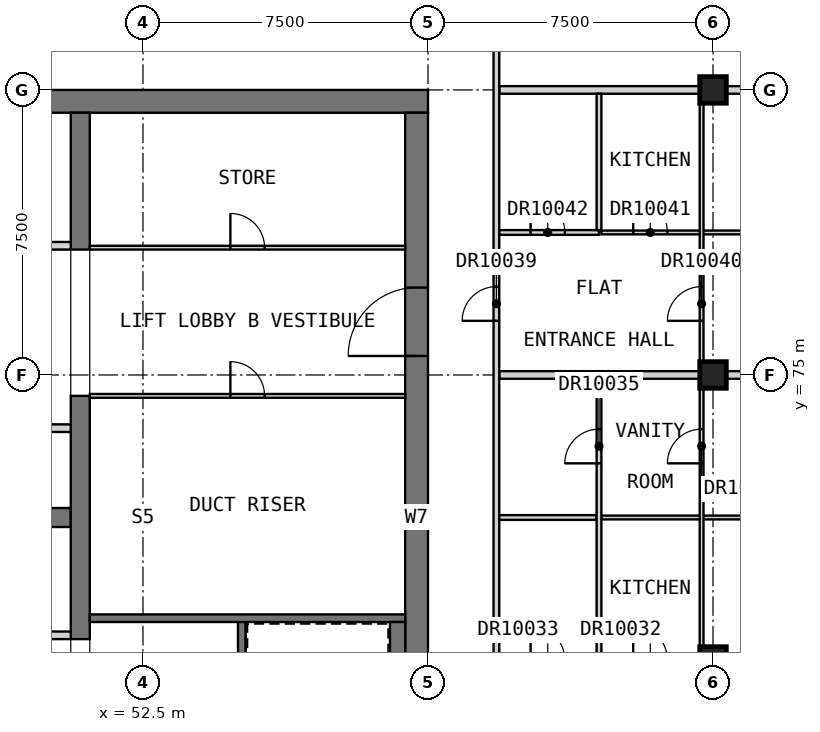
"""IFC4 building model, lengths in metres.
Left out: names, types, materials, properties, quantities, classifications, styles, units other than length and angle.
Written with IfcOpenShell. Run it as: python <this file> out.ifc"""

import sys

from ifc_helpers import new_model, si_unit, direction, frame, frame_2d, origin, origin_2d, place, context, subcontext, project, spatial, rectangle, extrude, element, fill, save


model = new_model("IFC4")
c1 = context("Model", 3, precision=1e-05, world=origin(), true_north=direction((0.0, 1.0)))
c2 = subcontext(c1, "Body", "Model", "MODEL_VIEW")
j1 = project(units=[si_unit("LENGTHUNIT", "METRE"), si_unit("PLANEANGLEUNIT", "RADIAN")], contexts=[c1])
p1 = place(None, origin())
s1 = spatial("IfcSite", under=j1, at=p1, CompositionType="ELEMENT")
p2 = place(p1, origin())
s2 = spatial("IfcBuilding", under=s1, at=p2, CompositionType="ELEMENT")
p3 = place(p2, frame((0.0, 0.0, 283.7)))
s3 = spatial("IfcBuildingStorey", under=s2, at=p3, CompositionType="ELEMENT", Elevation=283.7)
for number, where, z_axis, x_axis in (
    (1, (67.5, 67.5, 0.0), (0.0, 0.0, 1.0), (1.0, 0.0, 0.0)),
    (2, (67.5, 75.0, 0.0), (0.0, 0.0, 1.0), (1.0, 0.0, 0.0)),
    (3, (67.5, 82.5, 0.0), (0.0, 0.0, 1.0), (1.0, 0.0, 0.0)),
):
    element("IfcColumn", number, at=place(p3, frame(where, z_axis=z_axis, x_axis=x_axis)), inside=s3, PredefinedType="COLUMN", context=c2, shape_type="SweptSolid", body=[
        extrude(rectangle(XDim=0.7, YDim=0.7, at=origin_2d()), origin(), (0.0, 0.0, 1.0), 3.5),
    ])
p4 = place(p3, frame((30.0, 82.2, 0.0), z_axis=(0.0, 0.0, 1.0), x_axis=(1.0, 0.0, 0.0)))
e4 = element("IfcWall", 4, at=p4, inside=s3, PredefinedType="SHEAR", context=c2, shape_type="SweptSolid", body=[
    extrude(rectangle(XDim=30.0, YDim=0.6, at=frame_2d((15.0, 0.0))), origin(), (0.0, 0.0, 1.0), 3.5),
])
p5 = place(p3, frame((59.7, 60.6, 0.0), z_axis=(0.0, 0.0, 1.0), x_axis=(0.0, 1.0, 0.0)))
e5 = element("IfcWall", 5, at=p5, inside=s3, PredefinedType="SHEAR", context=c2, shape_type="SweptSolid", body=[
    extrude(rectangle(XDim=21.3, YDim=0.6, at=frame_2d((10.65, 0.0))), origin(), (0.0, 0.0, 1.0), 3.5),
])
p6 = place(p5, frame((14.9, 0.0, 0.0)))
e6 = element("IfcOpeningElement", 6, at=p6, cuts=e5, PredefinedType="OPENING", context=c2, shape_type="SweptSolid", body=[
    extrude(rectangle(XDim=1.8, YDim=2.1, at=frame_2d((0.9, 1.05))), frame((0.0, 0.31, 0.0), z_axis=(0.0, -1.0, 0.0), x_axis=(1.0, 0.0, 0.0)), (0.0, 0.0, 1.0), 0.62),
])
p7 = place(p3, frame((35.0, 71.25, 0.0), z_axis=(0.0, 0.0, 1.0), x_axis=(1.0, 0.0, 0.0)))
e7 = element("IfcWall", 7, at=p7, inside=s3, PredefinedType="SHEAR", context=c2, shape_type="SweptSolid", body=[
    extrude(rectangle(XDim=15.6, YDim=0.5, at=frame_2d((7.8, 0.0))), origin(), (0.0, 0.0, 1.0), 3.5),
])
p8 = place(p3, frame((50.85, 68.05, 0.0), z_axis=(0.0, 0.0, 1.0), x_axis=(0.0, 1.0, 0.0)))
e8 = element("IfcWall", 8, at=p8, inside=s3, PredefinedType="SHEAR", context=c2, shape_type="SweptSolid", body=[
    extrude(rectangle(XDim=6.4, YDim=0.5, at=frame_2d((3.2, 0.0))), origin(), (0.0, 0.0, 1.0), 3.5),
])
p9 = place(p3, frame((50.85, 78.3, 0.0), z_axis=(0.0, 0.0, 1.0), x_axis=(0.0, 1.0, 0.0)))
e9 = element("IfcWall", 9, at=p9, inside=s3, PredefinedType="SHEAR", context=c2, shape_type="SweptSolid", body=[
    extrude(rectangle(XDim=3.6, YDim=0.5, at=frame_2d((1.8, 0.0))), origin(), (0.0, 0.0, 1.0), 3.5),
])
p10 = place(p3, frame((35.0, 68.15, 0.0), z_axis=(0.0, 0.0, 1.0), x_axis=(1.0, 0.0, 0.0)))
e10 = element("IfcWall", 10, at=p10, inside=s3, PredefinedType="PARTITIONING", context=c2, shape_type="SweptSolid", body=[
    extrude(rectangle(XDim=15.6, YDim=0.2, at=frame_2d((7.8, 0.0))), origin(), (0.0, 0.0, 1.0), 3.2),
])
p11 = place(p10, frame((7.35, 0.0, 0.0)))
e11 = element("IfcOpeningElement", 11, at=p11, cuts=e10, PredefinedType="OPENING", context=c2, shape_type="SweptSolid", body=[
    extrude(rectangle(XDim=0.9, YDim=2.1, at=frame_2d((0.45, 1.05))), frame((0.0, 0.11, 0.0), z_axis=(0.0, -1.0, 0.0), x_axis=(1.0, 0.0, 0.0)), (0.0, 0.0, 1.0), 0.22),
])
p12 = place(p3, frame((35.0, 73.6, 0.0), z_axis=(0.0, 0.0, 1.0), x_axis=(1.0, 0.0, 0.0)))
e12 = element("IfcWall", 12, at=p12, inside=s3, PredefinedType="SOLIDWALL", context=c2, shape_type="SweptSolid", body=[
    extrude(rectangle(XDim=15.6, YDim=0.2, at=frame_2d((7.8, 0.0))), origin(), (0.0, 0.0, 1.0), 3.5),
])
p13 = place(p12, frame((0.75, 0.0, 0.0)))
e13 = element("IfcOpeningElement", 13, at=p13, cuts=e12, PredefinedType="OPENING", context=c2, shape_type="SweptSolid", body=[
    extrude(rectangle(XDim=1.1, YDim=2.1, at=frame_2d((0.55, 1.05))), frame((0.0, 0.11, 0.0), z_axis=(0.0, -1.0, 0.0), x_axis=(1.0, 0.0, 0.0)), (0.0, 0.0, 1.0), 0.22),
])
p14 = place(p12, frame((3.35, 0.0, 0.0)))
e14 = element("IfcOpeningElement", 14, at=p14, cuts=e12, PredefinedType="OPENING", context=c2, shape_type="SweptSolid", body=[
    extrude(rectangle(XDim=1.1, YDim=2.1, at=frame_2d((0.55, 1.05))), frame((0.0, 0.11, 0.0), z_axis=(0.0, -1.0, 0.0), x_axis=(1.0, 0.0, 0.0)), (0.0, 0.0, 1.0), 0.22),
])
p15 = place(p12, frame((5.95, 0.0, 0.0)))
e15 = element("IfcOpeningElement", 15, at=p15, cuts=e12, PredefinedType="OPENING", context=c2, shape_type="SweptSolid", body=[
    extrude(rectangle(XDim=1.1, YDim=2.1, at=frame_2d((0.55, 1.05))), frame((0.0, 0.11, 0.0), z_axis=(0.0, -1.0, 0.0), x_axis=(1.0, 0.0, 0.0)), (0.0, 0.0, 1.0), 0.22),
])
p16 = place(p12, frame((8.55, 0.0, 0.0)))
e16 = element("IfcOpeningElement", 16, at=p16, cuts=e12, PredefinedType="OPENING", context=c2, shape_type="SweptSolid", body=[
    extrude(rectangle(XDim=1.1, YDim=2.1, at=frame_2d((0.55, 1.05))), frame((0.0, 0.11, 0.0), z_axis=(0.0, -1.0, 0.0), x_axis=(1.0, 0.0, 0.0)), (0.0, 0.0, 1.0), 0.22),
])
p17 = place(p12, frame((11.15, 0.0, 0.0)))
e17 = element("IfcOpeningElement", 17, at=p17, cuts=e12, PredefinedType="OPENING", context=c2, shape_type="SweptSolid", body=[
    extrude(rectangle(XDim=1.1, YDim=2.1, at=frame_2d((0.55, 1.05))), frame((0.0, 0.11, 0.0), z_axis=(0.0, -1.0, 0.0), x_axis=(1.0, 0.0, 0.0)), (0.0, 0.0, 1.0), 0.22),
])
p18 = place(p12, frame((13.75, 0.0, 0.0)))
e18 = element("IfcOpeningElement", 18, at=p18, cuts=e12, PredefinedType="OPENING", context=c2, shape_type="SweptSolid", body=[
    extrude(rectangle(XDim=1.1, YDim=2.1, at=frame_2d((0.55, 1.05))), frame((0.0, 0.11, 0.0), z_axis=(0.0, -1.0, 0.0), x_axis=(1.0, 0.0, 0.0)), (0.0, 0.0, 1.0), 0.22),
])
p19 = place(p3, frame((35.0, 78.4, 0.0), z_axis=(0.0, 0.0, 1.0), x_axis=(1.0, 0.0, 0.0)))
e19 = element("IfcWall", 19, at=p19, inside=s3, PredefinedType="SOLIDWALL", context=c2, shape_type="SweptSolid", body=[
    extrude(rectangle(XDim=15.6, YDim=0.2, at=frame_2d((7.8, 0.0))), origin(), (0.0, 0.0, 1.0), 3.5),
])
p20 = place(p19, frame((0.75, 0.0, 0.0)))
e20 = element("IfcOpeningElement", 20, at=p20, cuts=e19, PredefinedType="OPENING", context=c2, shape_type="SweptSolid", body=[
    extrude(rectangle(XDim=1.1, YDim=2.1, at=frame_2d((0.55, 1.05))), frame((0.0, 0.11, 0.0), z_axis=(0.0, -1.0, 0.0), x_axis=(1.0, 0.0, 0.0)), (0.0, 0.0, 1.0), 0.22),
])
p21 = place(p19, frame((3.35, 0.0, 0.0)))
e21 = element("IfcOpeningElement", 21, at=p21, cuts=e19, PredefinedType="OPENING", context=c2, shape_type="SweptSolid", body=[
    extrude(rectangle(XDim=1.1, YDim=2.1, at=frame_2d((0.55, 1.05))), frame((0.0, 0.11, 0.0), z_axis=(0.0, -1.0, 0.0), x_axis=(1.0, 0.0, 0.0)), (0.0, 0.0, 1.0), 0.22),
])
p22 = place(p19, frame((11.15, 0.0, 0.0)))
e22 = element("IfcOpeningElement", 22, at=p22, cuts=e19, PredefinedType="OPENING", context=c2, shape_type="SweptSolid", body=[
    extrude(rectangle(XDim=1.1, YDim=2.1, at=frame_2d((0.55, 1.05))), frame((0.0, 0.11, 0.0), z_axis=(0.0, -1.0, 0.0), x_axis=(1.0, 0.0, 0.0)), (0.0, 0.0, 1.0), 0.22),
])
p23 = place(p19, frame((13.75, 0.0, 0.0)))
e23 = element("IfcOpeningElement", 23, at=p23, cuts=e19, PredefinedType="OPENING", context=c2, shape_type="SweptSolid", body=[
    extrude(rectangle(XDim=1.1, YDim=2.1, at=frame_2d((0.55, 1.05))), frame((0.0, 0.11, 0.0), z_axis=(0.0, -1.0, 0.0), x_axis=(1.0, 0.0, 0.0)), (0.0, 0.0, 1.0), 0.22),
])
p24 = place(p3, frame((55.1, 60.6, 0.0), z_axis=(0.0, 0.0, 1.0), x_axis=(0.0, 1.0, 0.0)))
e24 = element("IfcWall", 24, at=p24, inside=s3, PredefinedType="SOLIDWALL", context=c2, shape_type="SweptSolid", body=[
    extrude(rectangle(XDim=8.0, YDim=0.2, at=frame_2d((4.0, 0.0))), origin(), (0.0, 0.0, 1.0), 3.2),
])
p25 = place(p3, frame((51.1, 68.6, 0.0), z_axis=(0.0, 0.0, 1.0), x_axis=(1.0, 0.0, 0.0)))
e25 = element("IfcWall", 25, at=p25, inside=s3, PredefinedType="SOLIDWALL", context=c2, shape_type="SweptSolid", body=[
    extrude(rectangle(XDim=8.3, YDim=0.2, at=frame_2d((4.15, 0.0))), origin(), (0.0, 0.0, 1.0), 3.2),
])
p26 = place(p3, frame((59.2, 60.6, 0.0), z_axis=(0.0, 0.0, 1.0), x_axis=(0.0, 1.0, 0.0)))
e26 = element("IfcWall", 26, at=p26, inside=s3, PredefinedType="SOLIDWALL", context=c2, shape_type="SweptSolid", body=[
    extrude(rectangle(XDim=7.9, YDim=0.4, at=frame_2d((3.95, 0.0))), origin(), (0.0, 0.0, 1.0), 3.2),
])
p27 = place(p3, frame((51.1, 74.45, 0.0), z_axis=(0.0, 0.0, 1.0), x_axis=(1.0, 0.0, 0.0)))
e27 = element("IfcWall", 27, at=p27, inside=s3, PredefinedType="PARTITIONING", context=c2, shape_type="SweptSolid", body=[
    extrude(rectangle(XDim=8.3, YDim=0.1, at=frame_2d((4.15, 0.0))), origin(), (0.0, 0.0, 1.0), 3.2),
])
p28 = place(p27, frame((3.7, 0.0, 0.0)))
e28 = element("IfcOpeningElement", 28, at=p28, cuts=e27, PredefinedType="OPENING", context=c2, shape_type="SweptSolid", body=[
    extrude(rectangle(XDim=0.9, YDim=2.1, at=frame_2d((0.45, 1.05))), frame((0.0, 0.06, 0.0), z_axis=(0.0, -1.0, 0.0), x_axis=(1.0, 0.0, 0.0)), (0.0, 0.0, 1.0), 0.12),
])
p29 = place(p3, frame((51.1, 78.35, 0.0), z_axis=(0.0, 0.0, 1.0), x_axis=(1.0, 0.0, 0.0)))
e29 = element("IfcWall", 29, at=p29, inside=s3, PredefinedType="PARTITIONING", context=c2, shape_type="SweptSolid", body=[
    extrude(rectangle(XDim=8.3, YDim=0.1, at=frame_2d((4.15, 0.0))), origin(), (0.0, 0.0, 1.0), 3.2),
])
p30 = place(p29, frame((3.7, 0.0, 0.0)))
e30 = element("IfcOpeningElement", 30, at=p30, cuts=e29, PredefinedType="OPENING", context=c2, shape_type="SweptSolid", body=[
    extrude(rectangle(XDim=0.9, YDim=2.1, at=frame_2d((0.45, 1.05))), frame((0.0, 0.06, 0.0), z_axis=(0.0, -1.0, 0.0), x_axis=(1.0, 0.0, 0.0)), (0.0, 0.0, 1.0), 0.12),
])
for number, where, z_axis, x_axis in (
    (31, (61.875, 75.0, 0.0), (0.0, 0.0, 1.0), (1.0, 0.0, 0.0)),
    (32, (61.875, 82.5, 0.0), (0.0, 0.0, 1.0), (1.0, 0.0, 0.0)),
):
    element("IfcWall", number, at=place(p3, frame(where, z_axis=z_axis, x_axis=x_axis)), inside=s3, PredefinedType="PARTITIONING", context=c2, shape_type="SweptSolid", body=[
        extrude(rectangle(XDim=13.125, YDim=0.2, at=frame_2d((6.562, 0.0))), origin(), (0.0, 0.0, 1.0), 3.2),
    ])
p31 = place(p3, frame((61.8, 58.275, 0.0), z_axis=(0.0, 0.0, 1.0), x_axis=(0.0, 1.0, 0.0)))
e33 = element("IfcWall", 33, at=p31, inside=s3, PredefinedType="PARTITIONING", context=c2, shape_type="SweptSolid", body=[
    extrude(rectangle(XDim=25.95, YDim=0.15, at=frame_2d((12.975, 0.0))), origin(), (0.0, 0.0, 1.0), 3.2),
])
p32 = place(p31, frame((6.9, 0.0, 0.0)))
e34 = element("IfcOpeningElement", 34, at=p32, cuts=e33, PredefinedType="OPENING", context=c2, shape_type="SweptSolid", body=[
    extrude(rectangle(XDim=0.9, YDim=2.1, at=frame_2d((0.45, 1.05))), frame((0.0, 0.085, 0.0), z_axis=(0.0, -1.0, 0.0), x_axis=(1.0, 0.0, 0.0)), (0.0, 0.0, 1.0), 0.17),
])
p33 = place(p31, frame((18.15, 0.0, 0.0)))
e35 = element("IfcOpeningElement", 35, at=p33, cuts=e33, PredefinedType="OPENING", context=c2, shape_type="SweptSolid", body=[
    extrude(rectangle(XDim=0.9, YDim=2.1, at=frame_2d((0.45, 1.05))), frame((0.0, 0.085, 0.0), z_axis=(0.0, -1.0, 0.0), x_axis=(1.0, 0.0, 0.0)), (0.0, 0.0, 1.0), 0.17),
])
p34 = place(p3, frame((64.562, 71.25, 0.0), z_axis=(0.0, 0.0, 1.0), x_axis=(1.0, 0.0, 0.0)))
e36 = element("IfcWall", 36, at=p34, inside=s3, PredefinedType="PARTITIONING", context=c2, shape_type="SweptSolid", body=[
    extrude(rectangle(XDim=9.627, YDim=0.1, at=frame_2d((4.814, 0.0))), origin(), (0.0, 0.0, 1.0), 3.2),
])
p35 = place(p34, frame((6.087, 0.0, 0.0)))
e37 = element("IfcOpeningElement", 37, at=p35, cuts=e36, PredefinedType="OPENING", context=c2, shape_type="SweptSolid", body=[
    extrude(rectangle(XDim=0.9, YDim=2.1, at=frame_2d((0.45, 1.05))), frame((0.0, 0.06, 0.0), z_axis=(0.0, -1.0, 0.0), x_axis=(1.0, 0.0, 0.0)), (0.0, 0.0, 1.0), 0.12),
])
p36 = place(p3, frame((64.562, 78.75, 0.0), z_axis=(0.0, 0.0, 1.0), x_axis=(1.0, 0.0, 0.0)))
e38 = element("IfcWall", 38, at=p36, inside=s3, PredefinedType="PARTITIONING", context=c2, shape_type="SweptSolid", body=[
    extrude(rectangle(XDim=9.627, YDim=0.1, at=frame_2d((4.814, 0.0))), origin(), (0.0, 0.0, 1.0), 3.2),
])
p37 = place(p36, frame((0.837, 0.0, 0.0)))
e39 = element("IfcOpeningElement", 39, at=p37, cuts=e38, PredefinedType="OPENING", context=c2, shape_type="SweptSolid", body=[
    extrude(rectangle(XDim=0.9, YDim=2.1, at=frame_2d((0.45, 1.05))), frame((0.0, 0.06, 0.0), z_axis=(0.0, -1.0, 0.0), x_axis=(1.0, 0.0, 0.0)), (0.0, 0.0, 1.0), 0.12),
])
p38 = place(p36, frame((6.087, 0.0, 0.0)))
e40 = element("IfcOpeningElement", 40, at=p38, cuts=e38, PredefinedType="OPENING", context=c2, shape_type="SweptSolid", body=[
    extrude(rectangle(XDim=0.9, YDim=2.1, at=frame_2d((0.45, 1.05))), frame((0.0, 0.06, 0.0), z_axis=(0.0, -1.0, 0.0), x_axis=(1.0, 0.0, 0.0)), (0.0, 0.0, 1.0), 0.12),
])
p39 = place(p3, frame((67.2, 60.1, 0.0), z_axis=(0.0, 0.0, 1.0), x_axis=(0.0, 1.0, 0.0)))
e41 = element("IfcWall", 41, at=p39, inside=s3, PredefinedType="PARTITIONING", context=c2, shape_type="SweptSolid", body=[
    extrude(rectangle(XDim=22.3, YDim=0.1, at=frame_2d((11.15, 0.0))), origin(), (0.0, 0.0, 1.0), 3.2),
])
p40 = place(p39, frame((1.325, 0.0, 0.0)))
e42 = element("IfcOpeningElement", 42, at=p40, cuts=e41, PredefinedType="OPENING", context=c2, shape_type="SweptSolid", body=[
    extrude(rectangle(XDim=0.9, YDim=2.1, at=frame_2d((0.45, 1.05))), frame((0.0, 0.06, 0.0), z_axis=(0.0, -1.0, 0.0), x_axis=(1.0, 0.0, 0.0)), (0.0, 0.0, 1.0), 0.12),
])
p41 = place(p39, frame((5.075, 0.0, 0.0)))
e43 = element("IfcOpeningElement", 43, at=p41, cuts=e41, PredefinedType="OPENING", context=c2, shape_type="SweptSolid", body=[
    extrude(rectangle(XDim=0.9, YDim=2.1, at=frame_2d((0.45, 1.05))), frame((0.0, 0.06, 0.0), z_axis=(0.0, -1.0, 0.0), x_axis=(1.0, 0.0, 0.0)), (0.0, 0.0, 1.0), 0.12),
])
p42 = place(p39, frame((12.575, 0.0, 0.0)))
e44 = element("IfcOpeningElement", 44, at=p42, cuts=e41, PredefinedType="OPENING", context=c2, shape_type="SweptSolid", body=[
    extrude(rectangle(XDim=0.9, YDim=2.1, at=frame_2d((0.45, 1.05))), frame((0.0, 0.06, 0.0), z_axis=(0.0, -1.0, 0.0), x_axis=(1.0, 0.0, 0.0)), (0.0, 0.0, 1.0), 0.12),
])
p43 = place(p39, frame((16.325, 0.0, 0.0)))
e45 = element("IfcOpeningElement", 45, at=p43, cuts=e41, PredefinedType="OPENING", context=c2, shape_type="SweptSolid", body=[
    extrude(rectangle(XDim=0.9, YDim=2.1, at=frame_2d((0.45, 1.05))), frame((0.0, 0.06, 0.0), z_axis=(0.0, -1.0, 0.0), x_axis=(1.0, 0.0, 0.0)), (0.0, 0.0, 1.0), 0.12),
])
p44 = place(p3, frame((61.875, 71.25, 0.0), z_axis=(0.0, 0.0, 1.0), x_axis=(1.0, 0.0, 0.0)))
e46 = element("IfcWall", 46, at=p44, inside=s3, PredefinedType="PARTITIONING", context=c2, shape_type="SweptSolid", body=[
    extrude(rectangle(XDim=2.562, YDim=0.125, at=frame_2d((1.281, 0.0))), origin(), (0.0, 0.0, 1.0), 3.2),
])
p45 = place(p3, frame((61.875, 78.75, 0.0), z_axis=(0.0, 0.0, 1.0), x_axis=(1.0, 0.0, 0.0)))
e47 = element("IfcWall", 47, at=p45, inside=s3, PredefinedType="PARTITIONING", context=c2, shape_type="SweptSolid", body=[
    extrude(rectangle(XDim=2.625, YDim=0.125, at=frame_2d((1.312, 0.0))), origin(), (0.0, 0.0, 1.0), 3.2),
])
p46 = place(p45, frame((0.825, 0.0, 0.0)))
e48 = element("IfcOpeningElement", 48, at=p46, cuts=e47, PredefinedType="OPENING", context=c2, shape_type="SweptSolid", body=[
    extrude(rectangle(XDim=0.9, YDim=2.1, at=frame_2d((0.45, 1.05))), frame((0.0, 0.073, 0.0), z_axis=(0.0, -1.0, 0.0), x_axis=(1.0, 0.0, 0.0)), (0.0, 0.0, 1.0), 0.145),
])
p47 = place(p3, frame((64.5, 67.562, 0.0), z_axis=(0.0, 0.0, 1.0), x_axis=(0.0, 1.0, 0.0)))
e49 = element("IfcWall", 49, at=p47, inside=s3, PredefinedType="PARTITIONING", context=c2, shape_type="SweptSolid", body=[
    extrude(rectangle(XDim=7.337, YDim=0.125, at=frame_2d((3.669, 0.0))), origin(), (0.0, 0.0, 1.0), 3.2),
])
p48 = place(p47, frame((5.113, 0.0, 0.0)))
e50 = element("IfcOpeningElement", 50, at=p48, cuts=e49, PredefinedType="OPENING", context=c2, shape_type="SweptSolid", body=[
    extrude(rectangle(XDim=0.9, YDim=2.1, at=frame_2d((0.45, 1.05))), frame((0.0, 0.073, 0.0), z_axis=(0.0, -1.0, 0.0), x_axis=(1.0, 0.0, 0.0)), (0.0, 0.0, 1.0), 0.145),
])
p49 = place(p3, frame((64.5, 78.812, 0.0), z_axis=(0.0, 0.0, 1.0), x_axis=(0.0, 1.0, 0.0)))
e51 = element("IfcWall", 51, at=p49, inside=s3, PredefinedType="PARTITIONING", context=c2, shape_type="SweptSolid", body=[
    extrude(rectangle(XDim=3.587, YDim=0.125, at=frame_2d((1.794, 0.0))), origin(), (0.0, 0.0, 1.0), 3.2),
])
p50 = place(p6, origin())
e52 = element("IfcDoor", 52, at=p50, inside=s3, OperationType="DOUBLE_DOOR_SINGLE_SWING", PredefinedType="DOOR", context=c2, shape_type="SweptSolid", body=[
    extrude(rectangle(XDim=1.8, YDim=2.1, at=frame_2d((0.9, 1.05))), frame((0.0, 0.025, 0.0), z_axis=(0.0, -1.0, 0.0), x_axis=(1.0, 0.0, 0.0)), (0.0, 0.0, 1.0), 0.05),
])
fill(e6, e52)
p51 = place(p28, origin())
e53 = element("IfcDoor", 53, at=p51, inside=s3, OperationType="SINGLE_SWING_LEFT", PredefinedType="DOOR", context=c2, shape_type="SweptSolid", body=[
    extrude(rectangle(XDim=0.9, YDim=2.1, at=frame_2d((0.45, 1.05))), frame((0.0, 0.025, 0.0), z_axis=(0.0, -1.0, 0.0), x_axis=(1.0, 0.0, 0.0)), (0.0, 0.0, 1.0), 0.05),
])
fill(e28, e53)
p52 = place(p30, origin())
e54 = element("IfcDoor", 54, at=p52, inside=s3, OperationType="SINGLE_SWING_LEFT", PredefinedType="DOOR", context=c2, shape_type="SweptSolid", body=[
    extrude(rectangle(XDim=0.9, YDim=2.1, at=frame_2d((0.45, 1.05))), frame((0.0, 0.025, 0.0), z_axis=(0.0, -1.0, 0.0), x_axis=(1.0, 0.0, 0.0)), (0.0, 0.0, 1.0), 0.05),
])
fill(e30, e54)
p53 = place(p42, origin())
e55 = element("IfcDoor", 55, at=p53, inside=s3, OperationType="SINGLE_SWING_LEFT", PredefinedType="DOOR", context=c2, shape_type="SweptSolid", body=[
    extrude(rectangle(XDim=0.9, YDim=2.1, at=frame_2d((0.45, 1.05))), frame((0.0, 0.025, 0.0), z_axis=(0.0, -1.0, 0.0), x_axis=(1.0, 0.0, 0.0)), (0.0, 0.0, 1.0), 0.05),
])
fill(e44, e55)
p54 = place(p48, origin())
e56 = element("IfcDoor", 56, at=p54, inside=s3, OperationType="SINGLE_SWING_LEFT", PredefinedType="DOOR", context=c2, shape_type="SweptSolid", body=[
    extrude(rectangle(XDim=0.9, YDim=2.1, at=frame_2d((0.45, 1.05))), frame((0.0, 0.025, 0.0), z_axis=(0.0, -1.0, 0.0), x_axis=(1.0, 0.0, 0.0)), (0.0, 0.0, 1.0), 0.05),
])
fill(e50, e56)
p55 = place(p33, origin())
e57 = element("IfcDoor", 57, at=p55, inside=s3, OperationType="SINGLE_SWING_RIGHT", PredefinedType="DOOR", context=c2, shape_type="SweptSolid", body=[
    extrude(rectangle(XDim=0.9, YDim=2.1, at=frame_2d((0.45, 1.05))), frame((0.0, 0.025, 0.0), z_axis=(0.0, -1.0, 0.0), x_axis=(1.0, 0.0, 0.0)), (0.0, 0.0, 1.0), 0.05),
])
fill(e35, e57)
p56 = place(p43, origin())
e58 = element("IfcDoor", 58, at=p56, inside=s3, OperationType="SINGLE_SWING_LEFT", PredefinedType="DOOR", context=c2, shape_type="SweptSolid", body=[
    extrude(rectangle(XDim=0.9, YDim=2.1, at=frame_2d((0.45, 1.05))), frame((0.0, 0.025, 0.0), z_axis=(0.0, -1.0, 0.0), x_axis=(1.0, 0.0, 0.0)), (0.0, 0.0, 1.0), 0.05),
])
fill(e45, e58)
p57 = place(p37, origin())
e59 = element("IfcDoor", 59, at=p57, inside=s3, OperationType="SINGLE_SWING_LEFT", PredefinedType="DOOR", context=c2, shape_type="SweptSolid", body=[
    extrude(rectangle(XDim=0.9, YDim=2.1, at=frame_2d((0.45, 1.05))), frame((0.0, 0.025, 0.0), z_axis=(0.0, -1.0, 0.0), x_axis=(1.0, 0.0, 0.0)), (0.0, 0.0, 1.0), 0.05),
])
fill(e39, e59)
p58 = place(p46, origin())
e60 = element("IfcDoor", 60, at=p58, inside=s3, OperationType="SINGLE_SWING_LEFT", PredefinedType="DOOR", context=c2, shape_type="SweptSolid", body=[
    extrude(rectangle(XDim=0.9, YDim=2.1, at=frame_2d((0.45, 1.05))), frame((0.0, 0.025, 0.0), z_axis=(0.0, -1.0, 0.0), x_axis=(1.0, 0.0, 0.0)), (0.0, 0.0, 1.0), 0.05),
])
fill(e48, e60)
save(model, sys.argv[1])
